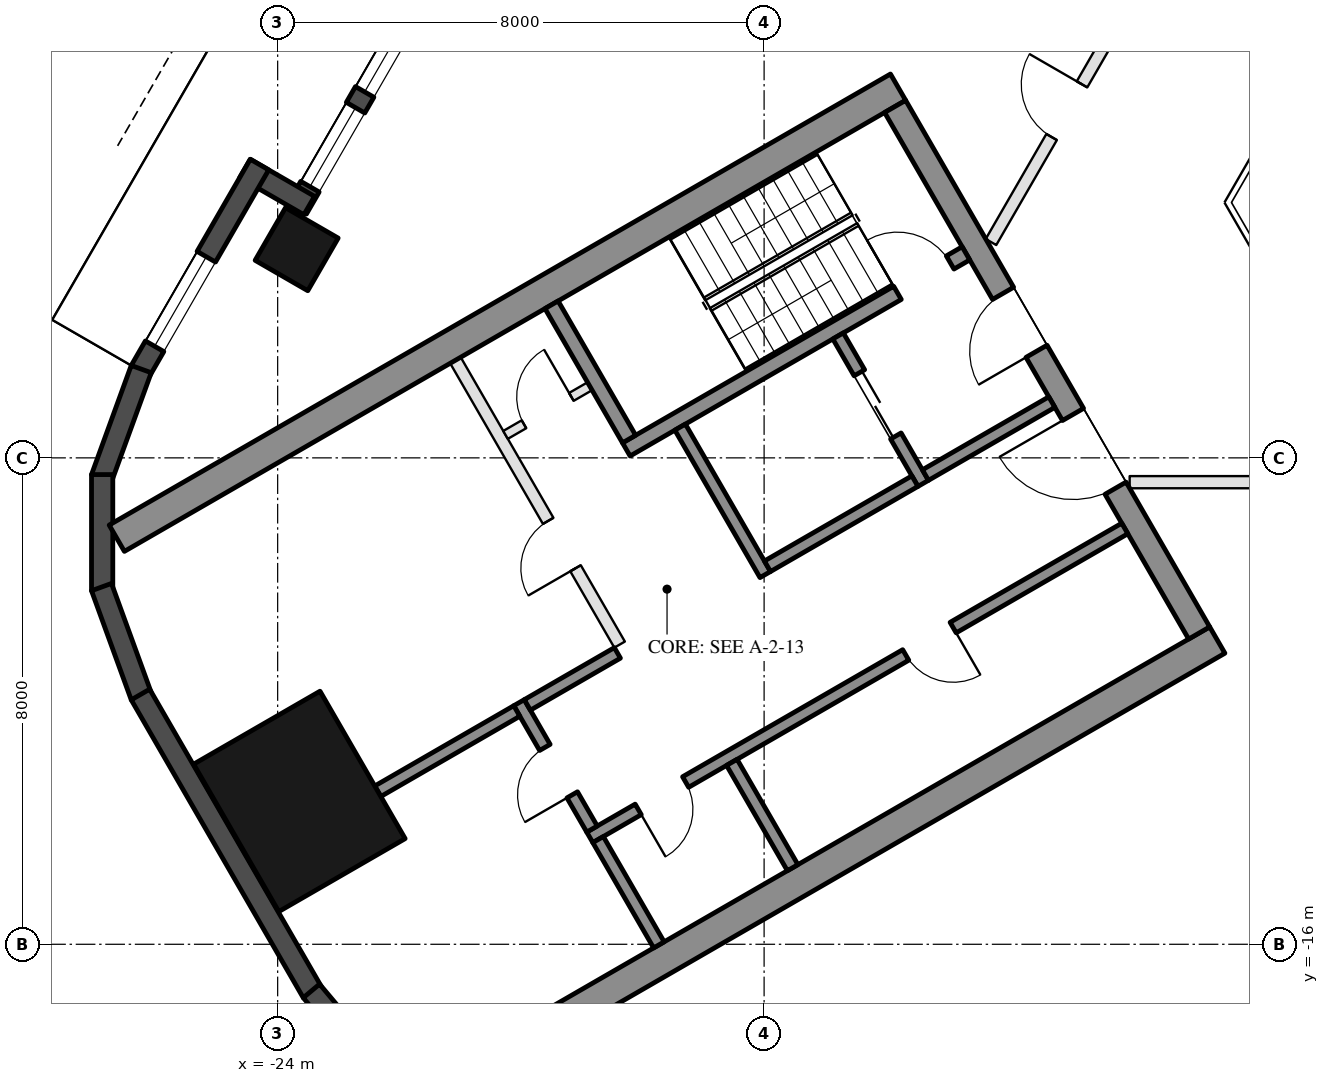
"""IFC4 building model, lengths in metres.
Left out: names, types, materials, properties, quantities, classifications, styles, units other than length and angle.
Written with IfcOpenShell. Run it as: python <this file> out.ifc"""

import sys

from ifc_helpers import new_model, si_unit, direction, frame, frame_2d, origin, origin_2d, place, context, subcontext, project, spatial, rectangle, hollow_rectangle, extrude, element, fill, save


model = new_model("IFC4")
c1 = context("Model", 3, precision=1e-05, world=origin(), true_north=direction((0.0, 1.0)))
c2 = subcontext(c1, "Body", "Model", "MODEL_VIEW")
j1 = project(units=[si_unit("LENGTHUNIT", "METRE"), si_unit("PLANEANGLEUNIT", "RADIAN")], contexts=[c1])
p1 = place(None, origin())
s1 = spatial("IfcSite", under=j1, at=p1, CompositionType="ELEMENT")
p2 = place(p1, origin())
s2 = spatial("IfcBuilding", under=s1, at=p2, CompositionType="ELEMENT")
p3 = place(p2, frame((0.0, 0.0, 68.7)))
s3 = spatial("IfcBuildingStorey", under=s2, at=p3, CompositionType="ELEMENT", Elevation=68.7)
p4 = place(p3, frame((-23.688, -4.568, 0.0), z_axis=(0.0, 0.0, 1.0), x_axis=(0.5, 0.866025403784, 0.0)))
e1 = element("IfcColumn", 1, at=p4, inside=s3, PredefinedType="COLUMN", context=c2, shape_type="SweptSolid", body=[
    extrude(hollow_rectangle(XDim=1.0, YDim=1.0, WallThickness=0.045, at=origin_2d()), origin(), (0.0, 0.0, 1.0), 3.7),
])
p5 = place(p3, frame((-23.643, -13.65, 0.0), z_axis=(0.0, 0.0, 1.0), x_axis=(-0.5, 0.866025403784, 0.0)))
e2 = element("IfcColumn", 2, at=p5, inside=s3, PredefinedType="COLUMN", context=c2, shape_type="SweptSolid", body=[
    extrude(hollow_rectangle(XDim=2.8, YDim=2.4, WallThickness=0.07, at=origin_2d()), origin(), (0.0, 0.0, 1.0), 3.7),
])
p6 = place(p3, frame((-20.309, 1.934, 0.0), z_axis=(0.0, 0.0, 1.0), x_axis=(-0.499992114976, -0.866029956157, 0.0)))
e3 = element("IfcWall", 3, at=p6, inside=s3, PredefinedType="SOLIDWALL", context=c2, shape_type="SweptSolid", body=[
    extrude(rectangle(XDim=6.74, YDim=0.35, at=frame_2d((3.37, 0.0))), origin(), (0.0, 0.0, 1.0), 3.55),
])
p7 = place(p6, frame((0.32, 0.0, 0.0)))
e4 = element("IfcOpeningElement", 4, at=p7, cuts=e3, PredefinedType="OPENING", context=c2, shape_type="SweptSolid", body=[
    extrude(rectangle(XDim=2.4, YDim=2.4, at=frame_2d((1.2, 1.2))), frame((0.0, 0.185, 0.0), z_axis=(0.0, -1.0, 0.0), x_axis=(1.0, 0.0, 0.0)), (0.0, 0.0, 1.0), 0.37),
])
p8 = place(p6, frame((3.02, 0.0, 0.3)))
e5 = element("IfcOpeningElement", 5, at=p8, cuts=e3, PredefinedType="OPENING", context=c2, shape_type="SweptSolid", body=[
    extrude(rectangle(XDim=1.5, YDim=2.65, at=frame_2d((0.75, 1.325))), frame((0.0, 0.185, 0.0), z_axis=(0.0, -1.0, 0.0), x_axis=(1.0, 0.0, 0.0)), (0.0, 0.0, 1.0), 0.37),
])
p9 = place(p6, frame((4.82, 0.0, 0.3)))
e6 = element("IfcOpeningElement", 6, at=p9, cuts=e3, PredefinedType="OPENING", context=c2, shape_type="SweptSolid", body=[
    extrude(rectangle(XDim=1.5, YDim=2.65, at=frame_2d((0.75, 1.325))), frame((0.0, 0.185, 0.0), z_axis=(0.0, -1.0, 0.0), x_axis=(1.0, 0.0, 0.0)), (0.0, 0.0, 1.0), 0.37),
])
p10 = place(p3, frame((-23.481, -3.85, 0.0), z_axis=(0.0, 0.0, 1.0), x_axis=(-0.866092288191, 0.499884134912, 0.0)))
e7 = element("IfcWall", 7, at=p10, inside=s3, PredefinedType="SOLIDWALL", context=c2, shape_type="SweptSolid", body=[
    extrude(rectangle(XDim=1.22, YDim=0.35, at=frame_2d((0.61, 0.0))), origin(), (0.0, 0.0, 1.0), 3.55),
])
p11 = place(p3, frame((-24.299, -3.176, 0.0), z_axis=(0.0, 0.0, 1.0), x_axis=(-0.500028278809, -0.866009076391, 0.0)))
e8 = element("IfcWall", 8, at=p11, inside=s3, PredefinedType="SOLIDWALL", context=c2, shape_type="SweptSolid", body=[
    extrude(rectangle(XDim=3.916, YDim=0.35, at=frame_2d((1.958, 0.0))), origin(), (0.0, 0.0, 1.0), 3.55),
])
p12 = place(p11, frame((1.75, 0.0, 0.3)))
e9 = element("IfcOpeningElement", 9, at=p12, cuts=e8, PredefinedType="OPENING", context=c2, shape_type="SweptSolid", body=[
    extrude(rectangle(XDim=1.7, YDim=2.65, at=frame_2d((0.85, 1.325))), frame((0.0, 0.185, 0.0), z_axis=(0.0, -1.0, 0.0), x_axis=(1.0, 0.0, 0.0)), (0.0, 0.0, 1.0), 0.37),
])
for number, where, z_axis, x_axis in (
    (10, (-26.244, -6.54, 0.0), (0.0, 0.0, 1.0), (-0.342, -0.94, 0.0)),
    (11, (-26.886, -8.275, 0.0), (0.0, 0.0, 1.0), (0.0, -1.0, 0.0)),
    (12, (-26.897, -10.125, 0.0), (0.0, 0.0, 1.0), (0.342, -0.94, 0.0)),
):
    element("IfcWall", number, at=place(p3, frame(where, z_axis=z_axis, x_axis=x_axis)), inside=s3, PredefinedType="SOLIDWALL", context=c2, shape_type="SweptSolid", body=[
        extrude(rectangle(XDim=1.91, YDim=0.35, at=frame_2d((0.955, 0.0))), origin(), (0.0, 0.0, 1.0), 3.55),
    ])
p13 = place(p3, frame((-26.257, -11.893, 0.0), z_axis=(0.0, 0.0, 1.0), x_axis=(0.500018773155, -0.866014564827, 0.0)))
e13 = element("IfcWall", 13, at=p13, inside=s3, PredefinedType="SOLIDWALL", context=c2, shape_type="SweptSolid", body=[
    extrude(rectangle(XDim=5.658, YDim=0.35, at=frame_2d((2.829, 0.0))), origin(), (0.0, 0.0, 1.0), 3.55),
])
p14 = place(p3, frame((-23.445, -16.768, 0.0), z_axis=(0.0, 0.0, 1.0), x_axis=(0.642733291068, -0.76609001857, 0.0)))
e14 = element("IfcWall", 14, at=p14, inside=s3, PredefinedType="SOLIDWALL", context=c2, shape_type="SweptSolid", body=[
    extrude(rectangle(XDim=1.91, YDim=0.35, at=frame_2d((0.955, 0.0))), origin(), (0.0, 0.0, 1.0), 3.55),
])
for number, where, z_axis, x_axis in (
    (15, (-13.797, -1.903, 0.0), (0.0, 0.0, 1.0), (-0.866, -0.5, 0.0)),
    (16, (-8.547, -10.997, 0.0), (0.0, 0.0, 1.0), (-0.866, -0.5, 0.0)),
):
    element("IfcWall", number, at=place(p3, frame(where, z_axis=z_axis, x_axis=x_axis)), inside=s3, PredefinedType="SHEAR", context=c2, shape_type="SweptSolid", body=[
        extrude(rectangle(XDim=14.837, YDim=0.5, at=frame_2d((7.418, 0.0))), origin(), (0.0, 0.0, 1.0), 3.5),
    ])
p15 = place(p3, frame((-13.845, -2.22, 0.0), z_axis=(0.0, 0.0, 1.0), x_axis=(0.500004234368, -0.866022959057, 0.0)))
e17 = element("IfcWall", 17, at=p15, inside=s3, PredefinedType="SHEAR", context=c2, shape_type="SweptSolid", body=[
    extrude(rectangle(XDim=10.0, YDim=0.4, at=frame_2d((5.0, 0.0))), origin(), (0.0, 0.0, 1.0), 3.5),
])
p16 = place(p15, frame((3.55, 0.0, 0.0)))
e18 = element("IfcOpeningElement", 18, at=p16, cuts=e17, PredefinedType="OPENING", context=c2, shape_type="SweptSolid", body=[
    extrude(rectangle(XDim=1.1, YDim=2.1, at=frame_2d((0.55, 1.05))), frame((0.0, 0.21, 0.0), z_axis=(0.0, -1.0, 0.0), x_axis=(1.0, 0.0, 0.0)), (0.0, 0.0, 1.0), 0.42),
])
p17 = place(p15, frame((5.85, 0.0, 0.0)))
e19 = element("IfcOpeningElement", 19, at=p17, cuts=e17, PredefinedType="OPENING", context=c2, shape_type="SweptSolid", body=[
    extrude(rectangle(XDim=1.4, YDim=2.1, at=frame_2d((0.7, 1.05))), frame((0.0, 0.21, 0.0), z_axis=(0.0, -1.0, 0.0), x_axis=(1.0, 0.0, 0.0)), (0.0, 0.0, 1.0), 0.42),
])
p18 = place(p3, frame((-12.681, -4.636, 0.0), z_axis=(0.0, 0.0, 1.0), x_axis=(-0.866021702275, -0.500006411147, 0.0)))
e20 = element("IfcWall", 20, at=p18, inside=s3, PredefinedType="SHEAR", context=c2, shape_type="SweptSolid", body=[
    extrude(rectangle(XDim=6.45, YDim=0.25, at=frame_2d((3.225, 0.0))), origin(), (0.0, 0.0, 1.0), 3.5),
])
p19 = place(p18, frame((0.3, 0.0, 0.0)))
e21 = element("IfcOpeningElement", 21, at=p19, cuts=e20, PredefinedType="OPENING", context=c2, shape_type="SweptSolid", body=[
    extrude(rectangle(XDim=1.0, YDim=2.1, at=frame_2d((0.5, 1.05))), frame((0.0, 0.135, 0.0), z_axis=(0.0, -1.0, 0.0), x_axis=(1.0, 0.0, 0.0)), (0.0, 0.0, 1.0), 0.27),
])
p20 = place(p3, frame((-19.496, -5.482, 0.0), z_axis=(0.0, 0.0, 1.0), x_axis=(0.499990435942, -0.866030925526, 0.0)))
e22 = element("IfcWall", 22, at=p20, inside=s3, PredefinedType="SHEAR", context=c2, shape_type="SweptSolid", body=[
    extrude(rectangle(XDim=2.55, YDim=0.25, at=frame_2d((1.275, 0.0))), origin(), (0.0, 0.0, 1.0), 3.5),
])
p21 = place(p3, frame((-17.381, -7.495, 0.0), z_axis=(0.0, 0.0, 1.0), x_axis=(0.500011755427, -0.866018616679, 0.0)))
e23 = element("IfcWall", 23, at=p21, inside=s3, PredefinedType="SHEAR", context=c2, shape_type="SweptSolid", body=[
    extrude(rectangle(XDim=2.8, YDim=0.2, at=frame_2d((1.4, 0.0))), origin(), (0.0, 0.0, 1.0), 3.5),
])
p22 = place(p3, frame((-14.783, -5.995, 0.0), z_axis=(0.0, 0.0, 1.0), x_axis=(0.49994636267, -0.866056369097, 0.0)))
e24 = element("IfcWall", 24, at=p22, inside=s3, PredefinedType="SHEAR", context=c2, shape_type="SweptSolid", body=[
    extrude(rectangle(XDim=2.8, YDim=0.2, at=frame_2d((1.4, 0.0))), origin(), (0.0, 0.0, 1.0), 3.5),
])
p23 = place(p22, frame((0.7, 0.0, 0.0)))
e25 = element("IfcOpeningElement", 25, at=p23, cuts=e24, PredefinedType="OPENING", context=c2, shape_type="SweptSolid", body=[
    extrude(rectangle(XDim=1.2, YDim=2.1, at=frame_2d((0.6, 1.05))), frame((0.0, 0.11, 0.0), z_axis=(0.0, -1.0, 0.0), x_axis=(1.0, 0.0, 0.0)), (0.0, 0.0, 1.0), 0.22),
])
p24 = place(p3, frame((-13.52, -8.383, 0.0), z_axis=(0.0, 0.0, 1.0), x_axis=(-0.866034573852, -0.49998411664, 0.0)))
e26 = element("IfcWall", 26, at=p24, inside=s3, PredefinedType="SHEAR", context=c2, shape_type="SweptSolid", body=[
    extrude(rectangle(XDim=2.8, YDim=0.2, at=frame_2d((1.4, 0.0))), origin(), (0.0, 0.0, 1.0), 3.5),
])
p25 = place(p3, frame((-11.268, -7.083, 0.0), z_axis=(0.0, 0.0, 1.0), x_axis=(-0.866050077142, -0.499957262057, 0.0)))
e27 = element("IfcWall", 27, at=p25, inside=s3, PredefinedType="SHEAR", context=c2, shape_type="SweptSolid", body=[
    extrude(rectangle(XDim=2.4, YDim=0.2, at=frame_2d((1.2, 0.0))), origin(), (0.0, 0.0, 1.0), 3.5),
])
p26 = place(p3, frame((-10.068, -9.162, 0.0), z_axis=(0.0, 0.0, 1.0), x_axis=(-0.866032725843, -0.499987317609, 0.0)))
e28 = element("IfcWall", 28, at=p26, inside=s3, PredefinedType="SHEAR", context=c2, shape_type="SweptSolid", body=[
    extrude(rectangle(XDim=10.16, YDim=0.2, at=frame_2d((5.08, 0.0))), origin(), (0.0, 0.0, 1.0), 3.5),
])
p27 = place(p26, frame((3.26, 0.0, 0.0)))
e29 = element("IfcOpeningElement", 29, at=p27, cuts=e28, PredefinedType="OPENING", context=c2, shape_type="SweptSolid", body=[
    extrude(rectangle(XDim=0.9, YDim=2.1, at=frame_2d((0.45, 1.05))), frame((0.0, 0.11, 0.0), z_axis=(0.0, -1.0, 0.0), x_axis=(1.0, 0.0, 0.0)), (0.0, 0.0, 1.0), 0.22),
])
p28 = place(p26, frame((8.34, 0.0, 0.0)))
e30 = element("IfcOpeningElement", 30, at=p28, cuts=e28, PredefinedType="OPENING", context=c2, shape_type="SweptSolid", body=[
    extrude(rectangle(XDim=0.9, YDim=2.1, at=frame_2d((0.45, 1.05))), frame((0.0, 0.11, 0.0), z_axis=(0.0, -1.0, 0.0), x_axis=(1.0, 0.0, 0.0)), (0.0, 0.0, 1.0), 0.22),
])
p29 = place(p3, frame((-20.031, -12.026, 0.0), z_axis=(0.0, 0.0, 1.0), x_axis=(0.500033551112, -0.866006032174, 0.0)))
e31 = element("IfcWall", 31, at=p29, inside=s3, PredefinedType="SHEAR", context=c2, shape_type="SweptSolid", body=[
    extrude(rectangle(XDim=2.4, YDim=0.2, at=frame_2d((1.2, 0.0))), origin(), (0.0, 0.0, 1.0), 3.5),
])
p30 = place(p29, frame((0.85, 0.0, 0.0)))
e32 = element("IfcOpeningElement", 32, at=p30, cuts=e31, PredefinedType="OPENING", context=c2, shape_type="SweptSolid", body=[
    extrude(rectangle(XDim=0.9, YDim=2.1, at=frame_2d((0.45, 1.05))), frame((0.0, 0.11, 0.0), z_axis=(0.0, -1.0, 0.0), x_axis=(1.0, 0.0, 0.0)), (0.0, 0.0, 1.0), 0.22),
])
p31 = place(p3, frame((-18.413, -11.208, 0.0), z_axis=(0.0, 0.0, 1.0), x_axis=(-0.866038183914, -0.499977863513, 0.0)))
e33 = element("IfcWall", 33, at=p31, inside=s3, PredefinedType="SHEAR", context=c2, shape_type="SweptSolid", body=[
    extrude(rectangle(XDim=1.71, YDim=0.2, at=frame_2d((0.855, 0.0))), origin(), (0.0, 0.0, 1.0), 3.5),
])
for number, where, z_axis, x_axis in (
    (34, (-16.531, -13.008, 0.0), (0.0, 0.0, 1.0), (0.5, -0.866, 0.0)),
    (35, (-18.73, -14.278, 0.0), (0.0, 0.0, 1.0), (0.5, -0.866, 0.0)),
):
    element("IfcWall", number, at=place(p3, frame(where, z_axis=z_axis, x_axis=x_axis)), inside=s3, PredefinedType="SHEAR", context=c2, shape_type="SweptSolid", body=[
        extrude(rectangle(XDim=2.0, YDim=0.2, at=frame_2d((1.0, 0.0))), origin(), (0.0, 0.0, 1.0), 3.5),
    ])
p32 = place(p3, frame((-20.067, -12.163, 0.0), z_axis=(0.0, 0.0, 1.0), x_axis=(-0.866060851709, -0.499938597367, 0.0)))
e36 = element("IfcWall", 36, at=p32, inside=s3, PredefinedType="SHEAR", context=c2, shape_type="SweptSolid", body=[
    extrude(rectangle(XDim=2.64, YDim=0.2, at=frame_2d((1.32, 0.0))), origin(), (0.0, 0.0, 1.0), 3.5),
])
p33 = place(p3, frame((-21.076, -6.395, 0.0), z_axis=(0.0, 0.0, 1.0), x_axis=(0.50001468107, -0.866016927499, 0.0)))
e37 = element("IfcWall", 37, at=p33, inside=s3, PredefinedType="PARTITIONING", context=c2, shape_type="SweptSolid", body=[
    extrude(rectangle(XDim=5.4, YDim=0.2, at=frame_2d((2.7, 0.0))), origin(), (0.0, 0.0, 1.0), 3.5),
])
p34 = place(p33, frame((3.05, 0.0, 0.0)))
e38 = element("IfcOpeningElement", 38, at=p34, cuts=e37, PredefinedType="OPENING", context=c2, shape_type="SweptSolid", body=[
    extrude(rectangle(XDim=0.9, YDim=2.1, at=frame_2d((0.45, 1.05))), frame((0.0, 0.11, 0.0), z_axis=(0.0, -1.0, 0.0), x_axis=(1.0, 0.0, 0.0)), (0.0, 0.0, 1.0), 0.22),
])
p35 = place(p3, frame((-18.866, -6.822, 0.0), z_axis=(0.0, 0.0, 1.0), x_axis=(-0.866028054938, -0.499995408039, 0.0)))
e39 = element("IfcWall", 39, at=p35, inside=s3, PredefinedType="PARTITIONING", context=c2, shape_type="SweptSolid", body=[
    extrude(rectangle(XDim=1.6, YDim=0.15, at=frame_2d((0.8, 0.0))), origin(), (0.0, 0.0, 1.0), 3.5),
])
p36 = place(p35, frame((0.35, 0.0, 0.0)))
e40 = element("IfcOpeningElement", 40, at=p36, cuts=e39, PredefinedType="OPENING", context=c2, shape_type="SweptSolid", body=[
    extrude(rectangle(XDim=0.9, YDim=2.1, at=frame_2d((0.45, 1.05))), frame((0.0, 0.085, 0.0), z_axis=(0.0, -1.0, 0.0), x_axis=(1.0, 0.0, 0.0)), (0.0, 0.0, 1.0), 0.17),
])
p37 = place(p3, frame((-0.1, -8.4, 0.0), z_axis=(0.0, 0.0, 1.0), x_axis=(-1.0, 0.0, 0.0)))
e41 = element("IfcWall", 41, at=p37, inside=s3, PredefinedType="PARTITIONING", context=c2, shape_type="SweptSolid", body=[
    extrude(rectangle(XDim=9.888, YDim=0.2, at=frame_2d((4.944, 0.0))), origin(), (0.0, 0.0, 1.0), 2.95),
])
p38 = place(p37, frame((4.444, 0.0, 0.0)))
e42 = element("IfcOpeningElement", 42, at=p38, cuts=e41, PredefinedType="OPENING", context=c2, shape_type="SweptSolid", body=[
    extrude(rectangle(XDim=1.0, YDim=2.1, at=frame_2d((0.5, 1.05))), frame((0.0, 0.11, 0.0), z_axis=(0.0, -1.0, 0.0), x_axis=(1.0, 0.0, 0.0)), (0.0, 0.0, 1.0), 0.22),
])
p39 = place(p3, frame((-12.269, -4.45, 0.0), z_axis=(0.0, 0.0, 1.0), x_axis=(0.500013374061, 0.866017682129, 0.0)))
e43 = element("IfcWall", 43, at=p39, inside=s3, PredefinedType="PARTITIONING", context=c2, shape_type="SweptSolid", body=[
    extrude(rectangle(XDim=4.988, YDim=0.2, at=frame_2d((2.494, 0.0))), origin(), (0.0, 0.0, 1.0), 2.95),
])
p40 = place(p39, frame((1.994, 0.0, 0.0)))
e44 = element("IfcOpeningElement", 44, at=p40, cuts=e43, PredefinedType="OPENING", context=c2, shape_type="SweptSolid", body=[
    extrude(rectangle(XDim=1.0, YDim=2.1, at=frame_2d((0.5, 1.05))), frame((0.0, 0.11, 0.0), z_axis=(0.0, -1.0, 0.0), x_axis=(1.0, 0.0, 0.0)), (0.0, 0.0, 1.0), 0.22),
])
p41 = place(p8, origin())
e45 = element("IfcWindow", 45, at=p41, inside=s3, PartitioningType="SINGLE_PANEL", PredefinedType="WINDOW", context=c2, shape_type="SweptSolid", body=[
    extrude(rectangle(XDim=1.5, YDim=2.65, at=frame_2d((0.75, 1.325))), frame((0.0, 0.03, 0.0), z_axis=(0.0, -1.0, 0.0), x_axis=(1.0, 0.0, 0.0)), (0.0, 0.0, 1.0), 0.06),
])
fill(e5, e45)
p42 = place(p9, origin())
e46 = element("IfcWindow", 46, at=p42, inside=s3, PartitioningType="SINGLE_PANEL", PredefinedType="WINDOW", context=c2, shape_type="SweptSolid", body=[
    extrude(rectangle(XDim=1.5, YDim=2.65, at=frame_2d((0.75, 1.325))), frame((0.0, 0.03, 0.0), z_axis=(0.0, -1.0, 0.0), x_axis=(1.0, 0.0, 0.0)), (0.0, 0.0, 1.0), 0.06),
])
fill(e6, e46)
p43 = place(p12, origin())
e47 = element("IfcWindow", 47, at=p43, inside=s3, PartitioningType="SINGLE_PANEL", PredefinedType="WINDOW", context=c2, shape_type="SweptSolid", body=[
    extrude(rectangle(XDim=1.7, YDim=2.65, at=frame_2d((0.85, 1.325))), frame((0.0, 0.03, 0.0), z_axis=(0.0, -1.0, 0.0), x_axis=(1.0, 0.0, 0.0)), (0.0, 0.0, 1.0), 0.06),
])
fill(e9, e47)
p44 = place(p23, origin())
e48 = element("IfcDoor", 48, at=p44, inside=s3, OperationType="DOUBLE_DOOR_SLIDING", PredefinedType="DOOR", context=c2, shape_type="SweptSolid", body=[
    extrude(rectangle(XDim=1.2, YDim=2.1, at=frame_2d((0.6, 1.05))), frame((0.0, 0.025, 0.0), z_axis=(0.0, -1.0, 0.0), x_axis=(1.0, 0.0, 0.0)), (0.0, 0.0, 1.0), 0.05),
])
fill(e25, e48)
p45 = place(p36, frame((0.9, 0.0, 0.0), z_axis=(0.0, 0.0, 1.0), x_axis=(-1.0, 0.0, 0.0)))
e49 = element("IfcDoor", 49, at=p45, inside=s3, OperationType="SINGLE_SWING_RIGHT", PredefinedType="DOOR", context=c2, shape_type="SweptSolid", body=[
    extrude(rectangle(XDim=0.9, YDim=2.1, at=frame_2d((0.45, 1.05))), frame((0.0, 0.025, 0.0), z_axis=(0.0, -1.0, 0.0), x_axis=(1.0, 0.0, 0.0)), (0.0, 0.0, 1.0), 0.05),
])
fill(e40, e49)
p46 = place(p27, origin())
e50 = element("IfcDoor", 50, at=p46, inside=s3, OperationType="SINGLE_SWING_LEFT", PredefinedType="DOOR", context=c2, shape_type="SweptSolid", body=[
    extrude(rectangle(XDim=0.9, YDim=2.1, at=frame_2d((0.45, 1.05))), frame((0.0, 0.025, 0.0), z_axis=(0.0, -1.0, 0.0), x_axis=(1.0, 0.0, 0.0)), (0.0, 0.0, 1.0), 0.05),
])
fill(e29, e50)
p47 = place(p28, origin())
e51 = element("IfcDoor", 51, at=p47, inside=s3, OperationType="SINGLE_SWING_RIGHT", PredefinedType="DOOR", context=c2, shape_type="SweptSolid", body=[
    extrude(rectangle(XDim=0.9, YDim=2.1, at=frame_2d((0.45, 1.05))), frame((0.0, 0.025, 0.0), z_axis=(0.0, -1.0, 0.0), x_axis=(1.0, 0.0, 0.0)), (0.0, 0.0, 1.0), 0.05),
])
fill(e30, e51)
p48 = place(p30, frame((0.9, 0.0, 0.0), z_axis=(0.0, 0.0, 1.0), x_axis=(-1.0, 0.0, 0.0)))
e52 = element("IfcDoor", 52, at=p48, inside=s3, OperationType="SINGLE_SWING_LEFT", PredefinedType="DOOR", context=c2, shape_type="SweptSolid", body=[
    extrude(rectangle(XDim=0.9, YDim=2.1, at=frame_2d((0.45, 1.05))), frame((0.0, 0.025, 0.0), z_axis=(0.0, -1.0, 0.0), x_axis=(1.0, 0.0, 0.0)), (0.0, 0.0, 1.0), 0.05),
])
fill(e32, e52)
p49 = place(p34, frame((0.9, 0.0, 0.0), z_axis=(0.0, 0.0, 1.0), x_axis=(-1.0, 0.0, 0.0)))
e53 = element("IfcDoor", 53, at=p49, inside=s3, OperationType="SINGLE_SWING_LEFT", PredefinedType="DOOR", context=c2, shape_type="SweptSolid", body=[
    extrude(rectangle(XDim=0.9, YDim=2.1, at=frame_2d((0.45, 1.05))), frame((0.0, 0.025, 0.0), z_axis=(0.0, -1.0, 0.0), x_axis=(1.0, 0.0, 0.0)), (0.0, 0.0, 1.0), 0.05),
])
fill(e38, e53)
p50 = place(p16, frame((1.1, 0.0, 0.0), z_axis=(0.0, 0.0, 1.0), x_axis=(-1.0, 0.0, 0.0)))
e54 = element("IfcDoor", 54, at=p50, inside=s3, OperationType="SINGLE_SWING_LEFT", PredefinedType="DOOR", context=c2, shape_type="SweptSolid", body=[
    extrude(rectangle(XDim=1.1, YDim=2.1, at=frame_2d((0.55, 1.05))), frame((0.0, 0.025, 0.0), z_axis=(0.0, -1.0, 0.0), x_axis=(1.0, 0.0, 0.0)), (0.0, 0.0, 1.0), 0.05),
])
fill(e18, e54)
p51 = place(p17, frame((1.4, 0.0, 0.0), z_axis=(0.0, 0.0, 1.0), x_axis=(-1.0, 0.0, 0.0)))
e55 = element("IfcDoor", 55, at=p51, inside=s3, OperationType="DOUBLE_DOOR_SINGLE_SWING", PredefinedType="DOOR", context=c2, shape_type="SweptSolid", body=[
    extrude(rectangle(XDim=1.4, YDim=2.1, at=frame_2d((0.7, 1.05))), frame((0.0, 0.025, 0.0), z_axis=(0.0, -1.0, 0.0), x_axis=(1.0, 0.0, 0.0)), (0.0, 0.0, 1.0), 0.05),
])
fill(e19, e55)
p52 = place(p19, frame((1.0, 0.0, 0.0), z_axis=(0.0, 0.0, 1.0), x_axis=(-1.0, 0.0, 0.0)))
e56 = element("IfcDoor", 56, at=p52, inside=s3, OperationType="SINGLE_SWING_LEFT", PredefinedType="DOOR", context=c2, shape_type="SweptSolid", body=[
    extrude(rectangle(XDim=1.0, YDim=2.1, at=frame_2d((0.5, 1.05))), frame((0.0, 0.025, 0.0), z_axis=(0.0, -1.0, 0.0), x_axis=(1.0, 0.0, 0.0)), (0.0, 0.0, 1.0), 0.05),
])
fill(e21, e56)
p53 = place(p40, origin())
e57 = element("IfcDoor", 57, at=p53, inside=s3, OperationType="SINGLE_SWING_RIGHT", PredefinedType="DOOR", context=c2, shape_type="SweptSolid", body=[
    extrude(rectangle(XDim=1.0, YDim=2.1, at=frame_2d((0.5, 1.05))), frame((0.0, 0.025, 0.0), z_axis=(0.0, -1.0, 0.0), x_axis=(1.0, 0.0, 0.0)), (0.0, 0.0, 1.0), 0.05),
])
fill(e44, e57)
save(model, sys.argv[1])
